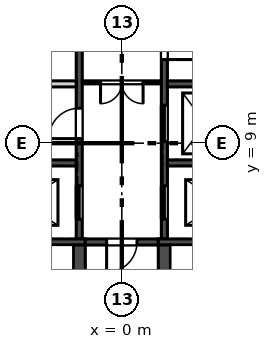
"""IFC4 building model, lengths in metres.
Left out: names, types, materials, properties, quantities, classifications, styles, units other than length and angle.
Written with IfcOpenShell. Run it as: python <this file> out.ifc"""

import sys

from ifc_helpers import new_model, si_unit, direction, frame, frame_2d, origin, place, context, subcontext, project, spatial, rectangle, extrude, element, fill, save


model = new_model("IFC4")
c1 = context("Model", 3, precision=1e-05, world=origin(), true_north=direction((0.0, 1.0)))
c2 = subcontext(c1, "Body", "Model", "MODEL_VIEW")
j1 = project(units=[si_unit("LENGTHUNIT", "METRE"), si_unit("PLANEANGLEUNIT", "RADIAN")], contexts=[c1])
p1 = place(None, origin())
s1 = spatial("IfcSite", under=j1, at=p1, CompositionType="ELEMENT")
p2 = place(p1, origin())
s2 = spatial("IfcBuilding", under=s1, at=p2, CompositionType="ELEMENT")
p3 = place(p2, frame((0.0, 0.0, 304.5)))
s3 = spatial("IfcBuildingStorey", under=s2, at=p3, CompositionType="ELEMENT", Elevation=304.5)
p4 = place(p3, frame((-1.4, 5.85, -0.4), z_axis=(0.0, 0.0, 1.0), x_axis=(0.0, 1.0, 0.0)))
e1 = element("IfcWall", 1, at=p4, inside=s3, PredefinedType="SOLIDWALL", context=c2, shape_type="SweptSolid", body=[
    extrude(rectangle(XDim=11.75, YDim=0.2, at=frame_2d((5.875, 0.0))), origin(), (0.0, 0.0, 1.0), 5.4),
])
p5 = place(p4, frame((0.65, 0.0, 0.4)))
e2 = element("IfcOpeningElement", 2, at=p5, cuts=e1, PredefinedType="OPENING", context=c2, shape_type="SweptSolid", body=[
    extrude(rectangle(XDim=1.1, YDim=2.1, at=frame_2d((0.55, 1.05))), frame((0.0, 0.11, 0.0), z_axis=(0.0, -1.0, 0.0), x_axis=(1.0, 0.0, 0.0)), (0.0, 0.0, 1.0), 0.22),
])
p6 = place(p4, frame((3.3, 0.0, 0.4)))
e3 = element("IfcOpeningElement", 3, at=p6, cuts=e1, PredefinedType="OPENING", context=c2, shape_type="SweptSolid", body=[
    extrude(rectangle(XDim=1.0, YDim=2.1, at=frame_2d((0.5, 1.05))), frame((0.0, 0.11, 0.0), z_axis=(0.0, -1.0, 0.0), x_axis=(1.0, 0.0, 0.0)), (0.0, 0.0, 1.0), 0.22),
])
p7 = place(p4, frame((7.2, 0.0, 0.4)))
e4 = element("IfcOpeningElement", 4, at=p7, cuts=e1, PredefinedType="OPENING", context=c2, shape_type="SweptSolid", body=[
    extrude(rectangle(XDim=1.0, YDim=2.1, at=frame_2d((0.5, 1.05))), frame((0.0, 0.11, 0.0), z_axis=(0.0, -1.0, 0.0), x_axis=(1.0, 0.0, 0.0)), (0.0, 0.0, 1.0), 0.22),
])
p8 = place(p3, frame((1.4, 5.85, -0.4), z_axis=(0.0, 0.0, 1.0), x_axis=(0.0, 1.0, 0.0)))
e5 = element("IfcWall", 5, at=p8, inside=s3, PredefinedType="SOLIDWALL", context=c2, shape_type="SweptSolid", body=[
    extrude(rectangle(XDim=11.75, YDim=0.2, at=frame_2d((5.875, 0.0))), origin(), (0.0, 0.0, 1.0), 5.4),
])
p9 = place(p8, frame((3.2, 0.0, 0.4)))
e6 = element("IfcOpeningElement", 6, at=p9, cuts=e5, PredefinedType="OPENING", context=c2, shape_type="SweptSolid", body=[
    extrude(rectangle(XDim=1.2, YDim=2.1, at=frame_2d((0.6, 1.05))), frame((0.0, 0.11, 0.0), z_axis=(0.0, -1.0, 0.0), x_axis=(1.0, 0.0, 0.0)), (0.0, 0.0, 1.0), 0.22),
])
p10 = place(p8, frame((0.65, 0.0, 0.4)))
e7 = element("IfcOpeningElement", 7, at=p10, cuts=e5, PredefinedType="OPENING", context=c2, shape_type="SweptSolid", body=[
    extrude(rectangle(XDim=1.1, YDim=2.1, at=frame_2d((0.55, 1.05))), frame((0.0, 0.11, 0.0), z_axis=(0.0, -1.0, 0.0), x_axis=(1.0, 0.0, 0.0)), (0.0, 0.0, 1.0), 0.22),
])
p11 = place(p8, frame((5.9, 0.0, 0.4)))
e8 = element("IfcOpeningElement", 8, at=p11, cuts=e5, PredefinedType="OPENING", context=c2, shape_type="SweptSolid", body=[
    extrude(rectangle(XDim=1.0, YDim=2.1, at=frame_2d((0.5, 1.05))), frame((0.0, 0.11, 0.0), z_axis=(0.0, -1.0, 0.0), x_axis=(1.0, 0.0, 0.0)), (0.0, 0.0, 1.0), 0.22),
])
for number, where, z_axis, x_axis in (
    (9, (-5.7, 8.35, -0.4), (0.0, 0.0, 1.0), (1.0, 0.0, 0.0)),
    (10, (1.5, 8.35, -0.4), (0.0, 0.0, 1.0), (1.0, 0.0, 0.0)),
):
    element("IfcWall", number, at=place(p3, frame(where, z_axis=z_axis, x_axis=x_axis)), inside=s3, PredefinedType="SOLIDWALL", context=c2, shape_type="SweptSolid", body=[
        extrude(rectangle(XDim=4.2, YDim=0.2, at=frame_2d((2.1, 0.0))), origin(), (0.0, 0.0, 1.0), 5.4),
    ])
p12 = place(p3, frame((-12.6, 5.75, -0.4), z_axis=(0.0, 0.0, 1.0), x_axis=(1.0, 0.0, 0.0)))
e11 = element("IfcWall", 11, at=p12, inside=s3, PredefinedType="SOLIDWALL", context=c2, shape_type="SweptSolid", body=[
    extrude(rectangle(XDim=11.4, YDim=0.2, at=frame_2d((5.7, 0.0))), origin(), (0.0, 0.0, 1.0), 5.4),
])
p13 = place(p3, frame((-1.2, 5.75, -0.4), z_axis=(0.0, 0.0, 1.0), x_axis=(1.0, 0.0, 0.0)))
e12 = element("IfcWall", 12, at=p13, inside=s3, PredefinedType="SOLIDWALL", context=c2, shape_type="SweptSolid", body=[
    extrude(rectangle(XDim=2.4, YDim=0.2, at=frame_2d((1.2, 0.0))), origin(), (0.0, 0.0, 1.0), 5.4),
])
p14 = place(p13, frame((0.7, 0.0, 0.4)))
e13 = element("IfcOpeningElement", 13, at=p14, cuts=e12, PredefinedType="OPENING", context=c2, shape_type="SweptSolid", body=[
    extrude(rectangle(XDim=1.0, YDim=2.1, at=frame_2d((0.5, 1.05))), frame((0.0, 0.11, 0.0), z_axis=(0.0, -1.0, 0.0), x_axis=(1.0, 0.0, 0.0)), (0.0, 0.0, 1.0), 0.22),
])
p15 = place(p3, frame((1.2, 5.75, -0.4), z_axis=(0.0, 0.0, 1.0), x_axis=(1.0, 0.0, 0.0)))
e14 = element("IfcWall", 14, at=p15, inside=s3, PredefinedType="SOLIDWALL", context=c2, shape_type="SweptSolid", body=[
    extrude(rectangle(XDim=11.4, YDim=0.2, at=frame_2d((5.7, 0.0))), origin(), (0.0, 0.0, 1.0), 5.4),
])
for number, where, z_axis, x_axis in (
    (15, (-1.4, 2.25, -0.4), (0.0, 0.0, 1.0), (0.0, 1.0, 0.0)),
    (16, (1.4, 2.25, -0.4), (0.0, 0.0, 1.0), (0.0, 1.0, 0.0)),
):
    element("IfcWall", number, at=place(p3, frame(where, z_axis=z_axis, x_axis=x_axis)), inside=s3, PredefinedType="SOLIDWALL", context=c2, shape_type="SweptSolid", body=[
        extrude(rectangle(XDim=3.4, YDim=0.4, at=frame_2d((1.7, 0.0))), origin(), (0.0, 0.0, 1.0), 5.4),
    ])
p16 = place(p3, frame((-3.5, 10.95, 0.0), z_axis=(0.0, 0.0, 1.0), x_axis=(1.0, 0.0, 0.0)))
e17 = element("IfcWall", 17, at=p16, inside=s3, PredefinedType="SOLIDWALL", context=c2, shape_type="SweptSolid", body=[
    extrude(rectangle(XDim=2.0, YDim=0.2, at=frame_2d((1.0, 0.0))), origin(), (0.0, 0.0, 1.0), 5.0),
])
p17 = place(p3, frame((1.5, 10.95, -0.4), z_axis=(0.0, 0.0, 1.0), x_axis=(1.0, 0.0, 0.0)))
e18 = element("IfcWall", 18, at=p17, inside=s3, PredefinedType="SOLIDWALL", context=c2, shape_type="SweptSolid", body=[
    extrude(rectangle(XDim=2.0, YDim=0.2, at=frame_2d((1.0, 0.0))), origin(), (0.0, 0.0, 1.0), 5.4),
])
p18 = place(p3, frame((-1.3, 11.0, 0.0), z_axis=(0.0, 0.0, 1.0), x_axis=(1.0, 0.0, 0.0)))
e19 = element("IfcWall", 19, at=p18, inside=s3, PredefinedType="PARTITIONING", context=c2, shape_type="SweptSolid", body=[
    extrude(rectangle(XDim=2.6, YDim=0.1, at=frame_2d((1.3, 0.0))), origin(), (0.0, 0.0, 1.0), 5.0),
])
p19 = place(p18, frame((0.6, 0.0, 0.0)))
e20 = element("IfcOpeningElement", 20, at=p19, cuts=e19, PredefinedType="OPENING", context=c2, shape_type="SweptSolid", body=[
    extrude(rectangle(XDim=1.4, YDim=2.1, at=frame_2d((0.7, 1.05))), frame((0.0, 0.06, 0.0), z_axis=(0.0, -1.0, 0.0), x_axis=(1.0, 0.0, 0.0)), (0.0, 0.0, 1.0), 0.12),
])
p20 = place(p5, origin())
e21 = element("IfcDoor", 21, at=p20, inside=s3, OperationType="SLIDING_TO_RIGHT", PredefinedType="DOOR", context=c2, shape_type="SweptSolid", body=[
    extrude(rectangle(XDim=1.1, YDim=2.1, at=frame_2d((0.55, 1.05))), frame((0.0, 0.025, 0.0), z_axis=(0.0, -1.0, 0.0), x_axis=(1.0, 0.0, 0.0)), (0.0, 0.0, 1.0), 0.05),
])
fill(e2, e21)
p21 = place(p9, origin())
e22 = element("IfcDoor", 22, at=p21, inside=s3, OperationType="SLIDING_TO_LEFT", PredefinedType="DOOR", context=c2, shape_type="SweptSolid", body=[
    extrude(rectangle(XDim=1.2, YDim=2.1, at=frame_2d((0.6, 1.05))), frame((0.0, 0.025, 0.0), z_axis=(0.0, -1.0, 0.0), x_axis=(1.0, 0.0, 0.0)), (0.0, 0.0, 1.0), 0.05),
])
fill(e6, e22)
p22 = place(p10, origin())
e23 = element("IfcDoor", 23, at=p22, inside=s3, OperationType="SLIDING_TO_RIGHT", PredefinedType="DOOR", context=c2, shape_type="SweptSolid", body=[
    extrude(rectangle(XDim=1.1, YDim=2.1, at=frame_2d((0.55, 1.05))), frame((0.0, 0.025, 0.0), z_axis=(0.0, -1.0, 0.0), x_axis=(1.0, 0.0, 0.0)), (0.0, 0.0, 1.0), 0.05),
])
fill(e7, e23)
p23 = place(p6, origin())
e24 = element("IfcDoor", 24, at=p23, inside=s3, OperationType="SINGLE_SWING_LEFT", PredefinedType="DOOR", context=c2, shape_type="SweptSolid", body=[
    extrude(rectangle(XDim=1.0, YDim=2.1, at=frame_2d((0.5, 1.05))), frame((0.0, 0.025, 0.0), z_axis=(0.0, -1.0, 0.0), x_axis=(1.0, 0.0, 0.0)), (0.0, 0.0, 1.0), 0.05),
])
fill(e3, e24)
p24 = place(p11, frame((1.0, 0.0, 0.0), z_axis=(0.0, 0.0, 1.0), x_axis=(-1.0, 0.0, 0.0)))
e25 = element("IfcDoor", 25, at=p24, inside=s3, OperationType="SINGLE_SWING_RIGHT", PredefinedType="DOOR", context=c2, shape_type="SweptSolid", body=[
    extrude(rectangle(XDim=1.0, YDim=2.1, at=frame_2d((0.5, 1.05))), frame((0.0, 0.025, 0.0), z_axis=(0.0, -1.0, 0.0), x_axis=(1.0, 0.0, 0.0)), (0.0, 0.0, 1.0), 0.05),
])
fill(e8, e25)
p25 = place(p14, frame((1.0, 0.0, 0.0), z_axis=(0.0, 0.0, 1.0), x_axis=(-1.0, 0.0, 0.0)))
e26 = element("IfcDoor", 26, at=p25, inside=s3, OperationType="SINGLE_SWING_RIGHT", PredefinedType="DOOR", context=c2, shape_type="SweptSolid", body=[
    extrude(rectangle(XDim=1.0, YDim=2.1, at=frame_2d((0.5, 1.05))), frame((0.0, 0.025, 0.0), z_axis=(0.0, -1.0, 0.0), x_axis=(1.0, 0.0, 0.0)), (0.0, 0.0, 1.0), 0.05),
])
fill(e13, e26)
p26 = place(p19, frame((1.4, 0.0, 0.0), z_axis=(0.0, 0.0, 1.0), x_axis=(-1.0, 0.0, 0.0)))
e27 = element("IfcDoor", 27, at=p26, inside=s3, OperationType="DOUBLE_DOOR_SINGLE_SWING", PredefinedType="DOOR", context=c2, shape_type="SweptSolid", body=[
    extrude(rectangle(XDim=1.4, YDim=2.1, at=frame_2d((0.7, 1.05))), frame((0.0, 0.025, 0.0), z_axis=(0.0, -1.0, 0.0), x_axis=(1.0, 0.0, 0.0)), (0.0, 0.0, 1.0), 0.05),
])
fill(e20, e27)
save(model, sys.argv[1])
